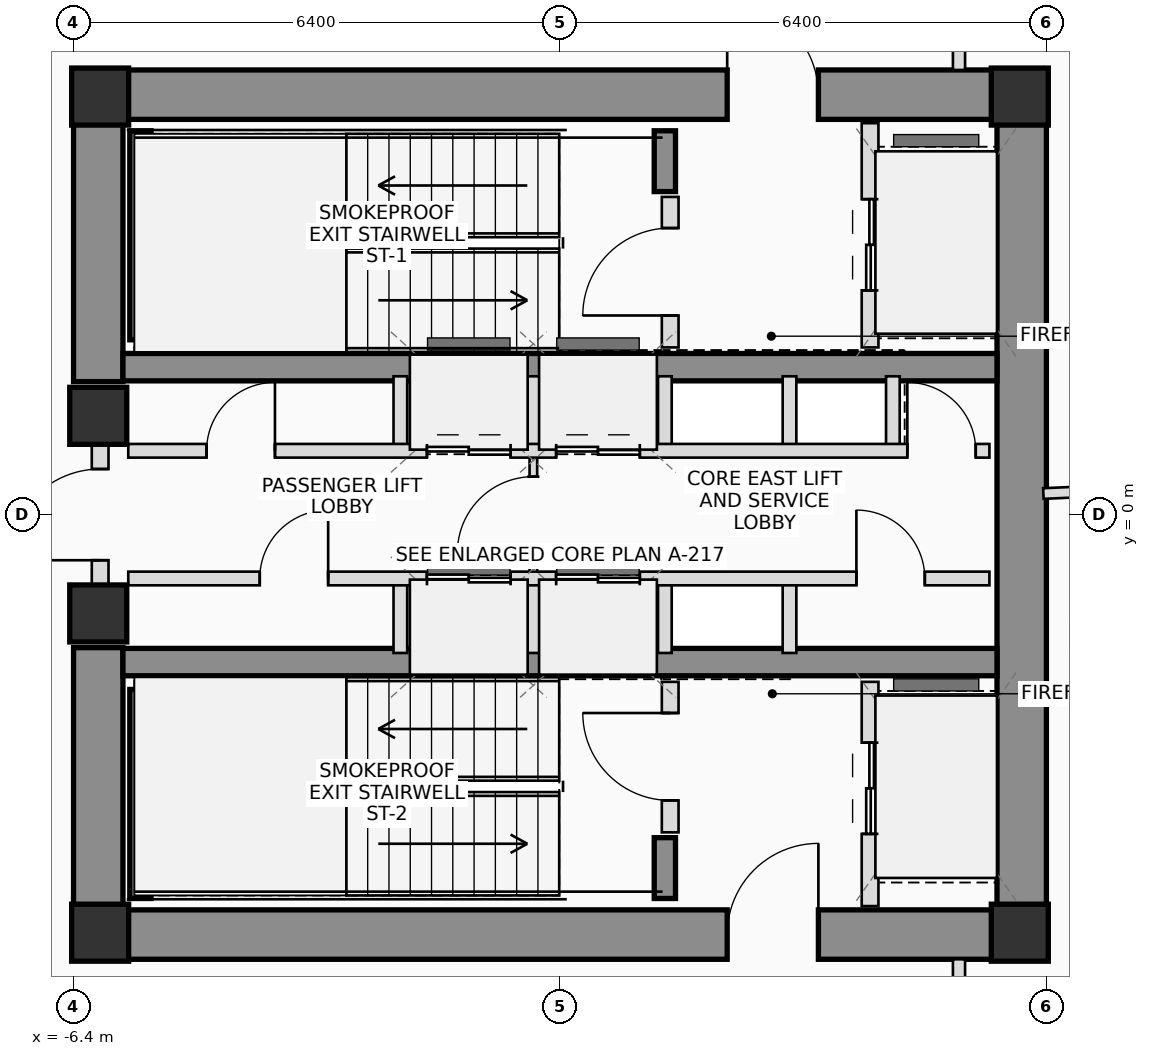
"""IFC4 building model, lengths in metres.
Left out: names, types, materials, properties, quantities, classifications, styles, units other than length and angle.
Written with IfcOpenShell. Run it as: python <this file> out.ifc"""

import sys

from ifc_helpers import new_model, si_unit, direction, frame, frame_2d, origin, origin_2d, place, context, subcontext, project, spatial, rectangle, extrude, source, transform, mapped, element, fill, save


model = new_model("IFC4")
c1 = context("Model", 3, precision=1e-05, world=origin(), true_north=direction((0.0, 1.0)))
c2 = subcontext(c1, "Body", "Model", "MODEL_VIEW")
j1 = project(units=[si_unit("LENGTHUNIT", "METRE"), si_unit("PLANEANGLEUNIT", "RADIAN")], contexts=[c1])
p1 = place(None, origin())
s1 = spatial("IfcSite", under=j1, at=p1, CompositionType="ELEMENT")
p2 = place(p1, origin())
s2 = spatial("IfcBuilding", under=s1, at=p2, CompositionType="ELEMENT")
p3 = place(p2, frame((0.0, 0.0, 182.9)))
s3 = spatial("IfcBuildingStorey", under=s2, at=p3, CompositionType="ELEMENT", Elevation=182.9)
m1 = source(origin(), c2, "Body", "SweptSolid", [
    extrude(rectangle(XDim=0.75, YDim=0.75, at=origin_2d()), origin(), (0.0, 0.0, 1.0), 3.45),
])
for number, where, z_axis, x_axis in (
    (1, (-6.05, -5.5, 0.0), (0.0, 0.0, 1.0), (1.0, 0.0, 0.0)),
    (2, (6.05, -5.5, 0.0), (0.0, 0.0, 1.0), (1.0, 0.0, 0.0)),
    (3, (6.05, 5.5, 0.0), (0.0, 0.0, 1.0), (1.0, 0.0, 0.0)),
    (4, (-6.05, 5.5, 0.0), (0.0, 0.0, 1.0), (1.0, 0.0, 0.0)),
):
    element("IfcColumn", number, at=place(p3, frame(where, z_axis=z_axis, x_axis=x_axis)), inside=s3, PredefinedType="COLUMN", context=c2, shape_type="MappedRepresentation", body=[
        mapped(m1, transform((0.0, 0.0, 0.0), scale=1.0)),
    ])
p4 = place(p3, frame((-6.4, 5.525, 0.0), z_axis=(0.0, 0.0, 1.0), x_axis=(1.0, 0.0, 0.0)))
e5 = element("IfcWall", 5, at=p4, inside=s3, PredefinedType="SHEAR", context=c2, shape_type="SweptSolid", body=[
    extrude(rectangle(XDim=12.8, YDim=0.65, at=frame_2d((6.4, 0.0))), origin(), (0.0, 0.0, 1.0), 3.45),
])
p5 = place(p4, frame((8.6, 0.0, 0.0)))
e6 = element("IfcOpeningElement", 6, at=p5, cuts=e5, PredefinedType="OPENING", context=c2, shape_type="SweptSolid", body=[
    extrude(rectangle(XDim=1.2, YDim=2.2, at=frame_2d((0.6, 1.1))), frame((0.0, 0.335, 0.0), z_axis=(0.0, -1.0, 0.0), x_axis=(1.0, 0.0, 0.0)), (0.0, 0.0, 1.0), 0.67),
])
p6 = place(p3, frame((-6.4, -5.525, 0.0), z_axis=(0.0, 0.0, 1.0), x_axis=(1.0, 0.0, 0.0)))
e7 = element("IfcWall", 7, at=p6, inside=s3, PredefinedType="SHEAR", context=c2, shape_type="SweptSolid", body=[
    extrude(rectangle(XDim=12.8, YDim=0.65, at=frame_2d((6.4, 0.0))), origin(), (0.0, 0.0, 1.0), 3.45),
])
p7 = place(p6, frame((8.6, 0.0, 0.0)))
e8 = element("IfcOpeningElement", 8, at=p7, cuts=e7, PredefinedType="OPENING", context=c2, shape_type="SweptSolid", body=[
    extrude(rectangle(XDim=1.2, YDim=2.2, at=frame_2d((0.6, 1.1))), frame((0.0, 0.335, 0.0), z_axis=(0.0, -1.0, 0.0), x_axis=(1.0, 0.0, 0.0)), (0.0, 0.0, 1.0), 0.67),
])
p8 = place(p3, frame((6.075, -5.2, 0.0), z_axis=(0.0, 0.0, 1.0), x_axis=(0.0, 1.0, 0.0)))
e9 = element("IfcWall", 9, at=p8, inside=s3, PredefinedType="SHEAR", context=c2, shape_type="SweptSolid", body=[
    extrude(rectangle(XDim=10.4, YDim=0.65, at=frame_2d((5.2, 0.0))), origin(), (0.0, 0.0, 1.0), 3.45),
])
for number, where, z_axis, x_axis in (
    (10, (-6.075, -5.2, 0.0), (0.0, 0.0, 1.0), (0.0, 1.0, 0.0)),
    (11, (-6.075, 1.75, 0.0), (0.0, 0.0, 1.0), (0.0, 1.0, 0.0)),
):
    element("IfcWall", number, at=place(p3, frame(where, z_axis=z_axis, x_axis=x_axis)), inside=s3, PredefinedType="SHEAR", context=c2, shape_type="SweptSolid", body=[
        extrude(rectangle(XDim=3.45, YDim=0.65, at=frame_2d((1.725, 0.0))), origin(), (0.0, 0.0, 1.0), 3.45),
    ])
for number, where, z_axis, x_axis in (
    (12, (-5.75, 1.94, 0.0), (0.0, 0.0, 1.0), (1.0, 0.0, 0.0)),
    (13, (-5.75, -1.94, 0.0), (0.0, 0.0, 1.0), (1.0, 0.0, 0.0)),
):
    element("IfcWall", number, at=place(p3, frame(where, z_axis=z_axis, x_axis=x_axis)), inside=s3, PredefinedType="SHEAR", context=c2, shape_type="SweptSolid", body=[
        extrude(rectangle(XDim=11.5, YDim=0.36, at=frame_2d((5.75, 0.0))), origin(), (0.0, 0.0, 1.0), 3.45),
    ])
p9 = place(p3, frame((-5.52, 2.3, 0.0), z_axis=(0.0, 0.0, 1.0), x_axis=(0.0, 1.0, 0.0)))
e14 = element("IfcWall", 14, at=p9, inside=s3, PredefinedType="SHEAR", context=c2, shape_type="SweptSolid", body=[
    extrude(rectangle(XDim=2.75, YDim=0.28, at=frame_2d((1.375, 0.0))), origin(), (0.0, 0.0, 1.0), 3.45),
])
p10 = place(p3, frame((1.38, 4.25, 0.0), z_axis=(0.0, 0.0, 1.0), x_axis=(0.0, 1.0, 0.0)))
e15 = element("IfcWall", 15, at=p10, inside=s3, PredefinedType="SHEAR", context=c2, shape_type="SweptSolid", body=[
    extrude(rectangle(XDim=0.8, YDim=0.28, at=frame_2d((0.4, 0.0))), origin(), (0.0, 0.0, 1.0), 3.45),
])
p11 = place(p3, frame((-5.52, -5.05, 0.0), z_axis=(0.0, 0.0, 1.0), x_axis=(0.0, 1.0, 0.0)))
e16 = element("IfcWall", 16, at=p11, inside=s3, PredefinedType="SHEAR", context=c2, shape_type="SweptSolid", body=[
    extrude(rectangle(XDim=2.75, YDim=0.28, at=frame_2d((1.375, 0.0))), origin(), (0.0, 0.0, 1.0), 3.45),
])
p12 = place(p3, frame((1.38, -5.05, 0.0), z_axis=(0.0, 0.0, 1.0), x_axis=(0.0, 1.0, 0.0)))
e17 = element("IfcWall", 17, at=p12, inside=s3, PredefinedType="SHEAR", context=c2, shape_type="SweptSolid", body=[
    extrude(rectangle(XDim=0.8, YDim=0.28, at=frame_2d((0.4, 0.0))), origin(), (0.0, 0.0, 1.0), 3.45),
])
for number, where, z_axis, x_axis in (
    (18, (-6.075, -1.3, 0.0), (0.0, 0.0, 1.0), (1.0, 0.0, 0.0)),
    (19, (-6.075, 1.3, 0.0), (0.0, 0.0, 1.0), (1.0, 0.0, 0.0)),
):
    element("IfcColumn", number, at=place(p3, frame(where, z_axis=z_axis, x_axis=x_axis)), inside=s3, PredefinedType="COLUMN", context=c2, shape_type="MappedRepresentation", body=[
        mapped(m1, transform((0.0, 0.0, 0.0), scale=1.0)),
    ])
p13 = place(p3, frame((-6.05, -0.95, 0.0), z_axis=(0.0, 0.0, 1.0), x_axis=(0.0, 1.0, 0.0)))
e20 = element("IfcWall", 20, at=p13, inside=s3, PredefinedType="PLUMBINGWALL", context=c2, shape_type="SweptSolid", body=[
    extrude(rectangle(XDim=1.9, YDim=0.22, at=frame_2d((0.95, 0.0))), origin(), (0.0, 0.0, 1.0), 2.19),
])
p14 = place(p13, frame((0.35, 0.0, 0.0)))
e21 = element("IfcOpeningElement", 21, at=p14, cuts=e20, PredefinedType="OPENING", context=c2, shape_type="SweptSolid", body=[
    extrude(rectangle(XDim=1.2, YDim=2.2, at=frame_2d((0.6, 1.1))), frame((0.0, 0.12, 0.0), z_axis=(0.0, -1.0, 0.0), x_axis=(1.0, 0.0, 0.0)), (0.0, 0.0, 1.0), 0.24),
])
p15 = place(p3, frame((1.45, 2.2, 0.0), z_axis=(0.0, 0.0, 1.0), x_axis=(0.0, 1.0, 0.0)))
e22 = element("IfcWall", 22, at=p15, inside=s3, PredefinedType="PLUMBINGWALL", context=c2, shape_type="SweptSolid", body=[
    extrude(rectangle(XDim=1.98, YDim=0.22, at=frame_2d((0.99, 0.0))), origin(), (0.0, 0.0, 1.0), 3.21),
])
p16 = place(p15, frame((0.42, 0.0, 0.0)))
e23 = element("IfcOpeningElement", 23, at=p16, cuts=e22, PredefinedType="OPENING", context=c2, shape_type="SweptSolid", body=[
    extrude(rectangle(XDim=1.15, YDim=2.15, at=frame_2d((0.575, 1.075))), frame((0.0, 0.12, 0.0), z_axis=(0.0, -1.0, 0.0), x_axis=(1.0, 0.0, 0.0)), (0.0, 0.0, 1.0), 0.24),
])
p17 = place(p3, frame((4.08, 2.2, 0.0), z_axis=(0.0, 0.0, 1.0), x_axis=(0.0, 1.0, 0.0)))
e24 = element("IfcWall", 24, at=p17, inside=s3, PredefinedType="PLUMBINGWALL", context=c2, shape_type="SweptSolid", body=[
    extrude(rectangle(XDim=2.95, YDim=0.22, at=frame_2d((1.475, 0.0))), origin(), (0.0, 0.0, 1.0), 3.21),
])
p18 = place(p17, frame((0.75, 0.0, 0.0)))
e25 = element("IfcOpeningElement", 25, at=p18, cuts=e24, PredefinedType="OPENING", context=c2, shape_type="SweptSolid", body=[
    extrude(rectangle(XDim=1.2, YDim=2.25, at=frame_2d((0.6, 1.125))), frame((0.0, 0.12, 0.0), z_axis=(0.0, -1.0, 0.0), x_axis=(1.0, 0.0, 0.0)), (0.0, 0.0, 1.0), 0.24),
])
p19 = place(p3, frame((1.45, -4.18, 0.0), z_axis=(0.0, 0.0, 1.0), x_axis=(0.0, 1.0, 0.0)))
e26 = element("IfcWall", 26, at=p19, inside=s3, PredefinedType="PLUMBINGWALL", context=c2, shape_type="SweptSolid", body=[
    extrude(rectangle(XDim=1.98, YDim=0.22, at=frame_2d((0.99, 0.0))), origin(), (0.0, 0.0, 1.0), 3.21),
])
p20 = place(p19, frame((0.42, 0.0, 0.0)))
e27 = element("IfcOpeningElement", 27, at=p20, cuts=e26, PredefinedType="OPENING", context=c2, shape_type="SweptSolid", body=[
    extrude(rectangle(XDim=1.15, YDim=2.15, at=frame_2d((0.575, 1.075))), frame((0.0, 0.12, 0.0), z_axis=(0.0, -1.0, 0.0), x_axis=(1.0, 0.0, 0.0)), (0.0, 0.0, 1.0), 0.24),
])
p21 = place(p3, frame((4.08, -5.15, 0.0), z_axis=(0.0, 0.0, 1.0), x_axis=(0.0, 1.0, 0.0)))
e28 = element("IfcWall", 28, at=p21, inside=s3, PredefinedType="PLUMBINGWALL", context=c2, shape_type="SweptSolid", body=[
    extrude(rectangle(XDim=2.95, YDim=0.22, at=frame_2d((1.475, 0.0))), origin(), (0.0, 0.0, 1.0), 3.21),
])
p22 = place(p21, frame((0.95, 0.0, 0.0)))
e29 = element("IfcOpeningElement", 29, at=p22, cuts=e28, PredefinedType="OPENING", context=c2, shape_type="SweptSolid", body=[
    extrude(rectangle(XDim=1.2, YDim=2.25, at=frame_2d((0.6, 1.125))), frame((0.0, 0.12, 0.0), z_axis=(0.0, -1.0, 0.0), x_axis=(1.0, 0.0, 0.0)), (0.0, 0.0, 1.0), 0.24),
])
p23 = place(p3, frame((-0.35, -0.84, 0.0), z_axis=(0.0, 0.0, 1.0), x_axis=(0.0, 1.0, 0.0)))
e30 = element("IfcWall", 30, at=p23, inside=s3, PredefinedType="PARTITIONING", context=c2, shape_type="SweptSolid", body=[
    extrude(rectangle(XDim=1.68, YDim=0.1, at=frame_2d((0.84, 0.0))), origin(), (0.0, 0.0, 1.0), 3.21),
])
p24 = place(p23, frame((0.34, 0.0, 0.0)))
e31 = element("IfcOpeningElement", 31, at=p24, cuts=e30, PredefinedType="OPENING", context=c2, shape_type="SweptSolid", body=[
    extrude(rectangle(XDim=1.0, YDim=2.25, at=frame_2d((0.5, 1.125))), frame((0.0, 0.06, 0.0), z_axis=(0.0, -1.0, 0.0), x_axis=(1.0, 0.0, 0.0)), (0.0, 0.0, 1.0), 0.12),
])
for number, where, z_axis, x_axis in (
    (32, (-2.1, 0.84, 0.0), (0.0, 0.0, 1.0), (0.0, 1.0, 0.0)),
    (33, (-2.1, -1.82, 0.0), (0.0, 0.0, 1.0), (0.0, 1.0, 0.0)),
    (34, (-0.35, 0.84, 0.0), (0.0, 0.0, 1.0), (0.0, 1.0, 0.0)),
    (35, (-0.35, -1.82, 0.0), (0.0, 0.0, 1.0), (0.0, 1.0, 0.0)),
    (36, (1.38, 0.84, 0.0), (0.0, 0.0, 1.0), (0.0, 1.0, 0.0)),
    (37, (1.38, -1.82, 0.0), (0.0, 0.0, 1.0), (0.0, 1.0, 0.0)),
    (38, (3.02, 0.84, 0.0), (0.0, 0.0, 1.0), (0.0, 1.0, 0.0)),
    (39, (4.38, 0.84, 0.0), (0.0, 0.0, 1.0), (0.0, 1.0, 0.0)),
    (40, (3.02, -1.82, 0.0), (0.0, 0.0, 1.0), (0.0, 1.0, 0.0)),
):
    element("IfcWall", number, at=place(p3, frame(where, z_axis=z_axis, x_axis=x_axis)), inside=s3, PredefinedType="PLUMBINGWALL", context=c2, shape_type="SweptSolid", body=[
        extrude(rectangle(XDim=0.98, YDim=0.18, at=frame_2d((0.49, 0.0))), origin(), (0.0, 0.0, 1.0), 3.21),
    ])
p25 = place(p3, frame((-5.68, 0.84, 0.0), z_axis=(0.0, 0.0, 1.0), x_axis=(1.0, 0.0, 0.0)))
e41 = element("IfcWall", 41, at=p25, inside=s3, PredefinedType="PLUMBINGWALL", context=c2, shape_type="SweptSolid", body=[
    extrude(rectangle(XDim=11.33, YDim=0.18, at=frame_2d((5.665, 0.0))), origin(), (0.0, 0.0, 1.0), 3.21),
])
p26 = place(p25, frame((1.03, 0.0, 0.0)))
e42 = element("IfcOpeningElement", 42, at=p26, cuts=e41, PredefinedType="OPENING", context=c2, shape_type="SweptSolid", body=[
    extrude(rectangle(XDim=0.9, YDim=2.05, at=frame_2d((0.45, 1.025))), frame((0.0, 0.1, 0.0), z_axis=(0.0, -1.0, 0.0), x_axis=(1.0, 0.0, 0.0)), (0.0, 0.0, 1.0), 0.2),
])
p27 = place(p25, frame((3.93, 0.0, 0.0)))
e43 = element("IfcOpeningElement", 43, at=p27, cuts=e41, PredefinedType="OPENING", context=c2, shape_type="SweptSolid", body=[
    extrude(rectangle(XDim=1.1, YDim=2.2, at=frame_2d((0.55, 1.1))), frame((0.0, 0.1, 0.0), z_axis=(0.0, -1.0, 0.0), x_axis=(1.0, 0.0, 0.0)), (0.0, 0.0, 1.0), 0.2),
])
p28 = place(p25, frame((5.63, 0.0, 0.0)))
e44 = element("IfcOpeningElement", 44, at=p28, cuts=e41, PredefinedType="OPENING", context=c2, shape_type="SweptSolid", body=[
    extrude(rectangle(XDim=1.1, YDim=2.2, at=frame_2d((0.55, 1.1))), frame((0.0, 0.1, 0.0), z_axis=(0.0, -1.0, 0.0), x_axis=(1.0, 0.0, 0.0)), (0.0, 0.0, 1.0), 0.2),
])
p29 = place(p25, frame((10.25, 0.0, 0.0)))
e45 = element("IfcOpeningElement", 45, at=p29, cuts=e41, PredefinedType="OPENING", context=c2, shape_type="SweptSolid", body=[
    extrude(rectangle(XDim=0.9, YDim=2.05, at=frame_2d((0.45, 1.025))), frame((0.0, 0.1, 0.0), z_axis=(0.0, -1.0, 0.0), x_axis=(1.0, 0.0, 0.0)), (0.0, 0.0, 1.0), 0.2),
])
p30 = place(p3, frame((-5.68, -0.84, 0.0), z_axis=(0.0, 0.0, 1.0), x_axis=(1.0, 0.0, 0.0)))
e46 = element("IfcWall", 46, at=p30, inside=s3, PredefinedType="PLUMBINGWALL", context=c2, shape_type="SweptSolid", body=[
    extrude(rectangle(XDim=11.33, YDim=0.18, at=frame_2d((5.665, 0.0))), origin(), (0.0, 0.0, 1.0), 3.21),
])
p31 = place(p30, frame((1.73, 0.0, 0.0)))
e47 = element("IfcOpeningElement", 47, at=p31, cuts=e46, PredefinedType="OPENING", context=c2, shape_type="SweptSolid", body=[
    extrude(rectangle(XDim=0.9, YDim=2.05, at=frame_2d((0.45, 1.025))), frame((0.0, 0.1, 0.0), z_axis=(0.0, -1.0, 0.0), x_axis=(1.0, 0.0, 0.0)), (0.0, 0.0, 1.0), 0.2),
])
p32 = place(p30, frame((3.93, 0.0, 0.0)))
e48 = element("IfcOpeningElement", 48, at=p32, cuts=e46, PredefinedType="OPENING", context=c2, shape_type="SweptSolid", body=[
    extrude(rectangle(XDim=1.1, YDim=2.2, at=frame_2d((0.55, 1.1))), frame((0.0, 0.1, 0.0), z_axis=(0.0, -1.0, 0.0), x_axis=(1.0, 0.0, 0.0)), (0.0, 0.0, 1.0), 0.2),
])
p33 = place(p30, frame((5.63, 0.0, 0.0)))
e49 = element("IfcOpeningElement", 49, at=p33, cuts=e46, PredefinedType="OPENING", context=c2, shape_type="SweptSolid", body=[
    extrude(rectangle(XDim=1.1, YDim=2.2, at=frame_2d((0.55, 1.1))), frame((0.0, 0.1, 0.0), z_axis=(0.0, -1.0, 0.0), x_axis=(1.0, 0.0, 0.0)), (0.0, 0.0, 1.0), 0.2),
])
p34 = place(p30, frame((9.58, 0.0, 0.0)))
e50 = element("IfcOpeningElement", 50, at=p34, cuts=e46, PredefinedType="OPENING", context=c2, shape_type="SweptSolid", body=[
    extrude(rectangle(XDim=0.9, YDim=2.05, at=frame_2d((0.45, 1.025))), frame((0.0, 0.1, 0.0), z_axis=(0.0, -1.0, 0.0), x_axis=(1.0, 0.0, 0.0)), (0.0, 0.0, 1.0), 0.2),
])
for number, where, z_axis, x_axis in (
    (51, (5.25, 7.6, 0.0), (0.0, 0.0, 1.0), (0.0, -1.0, 0.0)),
    (52, (5.25, -5.85, 0.0), (0.0, 0.0, 1.0), (0.0, -1.0, 0.0)),
):
    element("IfcWall", number, at=place(p3, frame(where, z_axis=z_axis, x_axis=x_axis)), inside=s3, PredefinedType="PARTITIONING", context=c2, shape_type="SweptSolid", body=[
        extrude(rectangle(XDim=1.75, YDim=0.16, at=frame_2d((0.875, 0.0))), origin(), (0.0, 0.0, 1.0), 3.21),
    ])
p35 = place(p3, frame((6.36, 0.278, 0.0), z_axis=(0.0, 0.0, 1.0), x_axis=(0.999047543566, 0.043634913719, 0.0)))
e53 = element("IfcWall", 53, at=p35, inside=s3, PredefinedType="PARTITIONING", context=c2, shape_type="SweptSolid", body=[
    extrude(rectangle(XDim=7.503, YDim=0.14, at=frame_2d((3.751, 0.0))), origin(), (0.0, 0.0, 1.0), 2.725),
])
p36 = place(p5, origin())
e54 = element("IfcDoor", 54, at=p36, inside=s3, OperationType="SINGLE_SWING_LEFT", PredefinedType="DOOR", context=c2, shape_type="SweptSolid", body=[
    extrude(rectangle(XDim=1.2, YDim=2.2, at=frame_2d((0.6, 1.1))), frame((0.0, 0.025, 0.0), z_axis=(0.0, -1.0, 0.0), x_axis=(1.0, 0.0, 0.0)), (0.0, 0.0, 1.0), 0.05),
])
fill(e6, e54)
p37 = place(p7, origin())
e55 = element("IfcDoor", 55, at=p37, inside=s3, OperationType="SINGLE_SWING_RIGHT", PredefinedType="DOOR", context=c2, shape_type="SweptSolid", body=[
    extrude(rectangle(XDim=1.2, YDim=2.2, at=frame_2d((0.6, 1.1))), frame((0.0, 0.025, 0.0), z_axis=(0.0, -1.0, 0.0), x_axis=(1.0, 0.0, 0.0)), (0.0, 0.0, 1.0), 0.05),
])
fill(e8, e55)
p38 = place(p14, origin())
e56 = element("IfcDoor", 56, at=p38, inside=s3, OperationType="SINGLE_SWING_LEFT", PredefinedType="DOOR", context=c2, shape_type="SweptSolid", body=[
    extrude(rectangle(XDim=1.2, YDim=2.2, at=frame_2d((0.6, 1.1))), frame((0.0, 0.025, 0.0), z_axis=(0.0, -1.0, 0.0), x_axis=(1.0, 0.0, 0.0)), (0.0, 0.0, 1.0), 0.05),
])
fill(e21, e56)
p39 = place(p16, origin())
e57 = element("IfcDoor", 57, at=p39, inside=s3, OperationType="SINGLE_SWING_LEFT", PredefinedType="DOOR", context=c2, shape_type="SweptSolid", body=[
    extrude(rectangle(XDim=1.15, YDim=2.15, at=frame_2d((0.575, 1.075))), frame((0.0, 0.025, 0.0), z_axis=(0.0, -1.0, 0.0), x_axis=(1.0, 0.0, 0.0)), (0.0, 0.0, 1.0), 0.05),
])
fill(e23, e57)
p40 = place(p18, origin())
e58 = element("IfcDoor", 58, at=p40, inside=s3, OperationType="DOUBLE_DOOR_SLIDING", PredefinedType="DOOR", context=c2, shape_type="SweptSolid", body=[
    extrude(rectangle(XDim=1.2, YDim=2.25, at=frame_2d((0.6, 1.125))), frame((0.0, 0.025, 0.0), z_axis=(0.0, -1.0, 0.0), x_axis=(1.0, 0.0, 0.0)), (0.0, 0.0, 1.0), 0.05),
])
fill(e25, e58)
p41 = place(p20, origin())
e59 = element("IfcDoor", 59, at=p41, inside=s3, OperationType="SINGLE_SWING_RIGHT", PredefinedType="DOOR", context=c2, shape_type="SweptSolid", body=[
    extrude(rectangle(XDim=1.15, YDim=2.15, at=frame_2d((0.575, 1.075))), frame((0.0, 0.025, 0.0), z_axis=(0.0, -1.0, 0.0), x_axis=(1.0, 0.0, 0.0)), (0.0, 0.0, 1.0), 0.05),
])
fill(e27, e59)
p42 = place(p22, origin())
e60 = element("IfcDoor", 60, at=p42, inside=s3, OperationType="DOUBLE_DOOR_SLIDING", PredefinedType="DOOR", context=c2, shape_type="SweptSolid", body=[
    extrude(rectangle(XDim=1.2, YDim=2.25, at=frame_2d((0.6, 1.125))), frame((0.0, 0.025, 0.0), z_axis=(0.0, -1.0, 0.0), x_axis=(1.0, 0.0, 0.0)), (0.0, 0.0, 1.0), 0.05),
])
fill(e29, e60)
p43 = place(p24, origin())
e61 = element("IfcDoor", 61, at=p43, inside=s3, OperationType="SINGLE_SWING_LEFT", PredefinedType="DOOR", context=c2, shape_type="SweptSolid", body=[
    extrude(rectangle(XDim=1.0, YDim=2.25, at=frame_2d((0.5, 1.125))), frame((0.0, 0.025, 0.0), z_axis=(0.0, -1.0, 0.0), x_axis=(1.0, 0.0, 0.0)), (0.0, 0.0, 1.0), 0.05),
])
fill(e31, e61)
p44 = place(p26, origin())
e62 = element("IfcDoor", 62, at=p44, inside=s3, OperationType="SINGLE_SWING_RIGHT", PredefinedType="DOOR", context=c2, shape_type="SweptSolid", body=[
    extrude(rectangle(XDim=0.9, YDim=2.05, at=frame_2d((0.45, 1.025))), frame((0.0, 0.025, 0.0), z_axis=(0.0, -1.0, 0.0), x_axis=(1.0, 0.0, 0.0)), (0.0, 0.0, 1.0), 0.05),
])
fill(e42, e62)
p45 = place(p27, origin())
e63 = element("IfcDoor", 63, at=p45, inside=s3, OperationType="DOUBLE_DOOR_SLIDING", PredefinedType="DOOR", context=c2, shape_type="SweptSolid", body=[
    extrude(rectangle(XDim=1.1, YDim=2.2, at=frame_2d((0.55, 1.1))), frame((0.0, 0.025, 0.0), z_axis=(0.0, -1.0, 0.0), x_axis=(1.0, 0.0, 0.0)), (0.0, 0.0, 1.0), 0.05),
])
fill(e43, e63)
p46 = place(p28, origin())
e64 = element("IfcDoor", 64, at=p46, inside=s3, OperationType="DOUBLE_DOOR_SLIDING", PredefinedType="DOOR", context=c2, shape_type="SweptSolid", body=[
    extrude(rectangle(XDim=1.1, YDim=2.2, at=frame_2d((0.55, 1.1))), frame((0.0, 0.025, 0.0), z_axis=(0.0, -1.0, 0.0), x_axis=(1.0, 0.0, 0.0)), (0.0, 0.0, 1.0), 0.05),
])
fill(e44, e64)
p47 = place(p29, origin())
e65 = element("IfcDoor", 65, at=p47, inside=s3, OperationType="SINGLE_SWING_LEFT", PredefinedType="DOOR", context=c2, shape_type="SweptSolid", body=[
    extrude(rectangle(XDim=0.9, YDim=2.05, at=frame_2d((0.45, 1.025))), frame((0.0, 0.025, 0.0), z_axis=(0.0, -1.0, 0.0), x_axis=(1.0, 0.0, 0.0)), (0.0, 0.0, 1.0), 0.05),
])
fill(e45, e65)
p48 = place(p31, origin())
e66 = element("IfcDoor", 66, at=p48, inside=s3, OperationType="SINGLE_SWING_RIGHT", PredefinedType="DOOR", context=c2, shape_type="SweptSolid", body=[
    extrude(rectangle(XDim=0.9, YDim=2.05, at=frame_2d((0.45, 1.025))), frame((0.0, 0.025, 0.0), z_axis=(0.0, -1.0, 0.0), x_axis=(1.0, 0.0, 0.0)), (0.0, 0.0, 1.0), 0.05),
])
fill(e47, e66)
p49 = place(p32, origin())
e67 = element("IfcDoor", 67, at=p49, inside=s3, OperationType="DOUBLE_DOOR_SLIDING", PredefinedType="DOOR", context=c2, shape_type="SweptSolid", body=[
    extrude(rectangle(XDim=1.1, YDim=2.2, at=frame_2d((0.55, 1.1))), frame((0.0, 0.025, 0.0), z_axis=(0.0, -1.0, 0.0), x_axis=(1.0, 0.0, 0.0)), (0.0, 0.0, 1.0), 0.05),
])
fill(e48, e67)
p50 = place(p33, origin())
e68 = element("IfcDoor", 68, at=p50, inside=s3, OperationType="DOUBLE_DOOR_SLIDING", PredefinedType="DOOR", context=c2, shape_type="SweptSolid", body=[
    extrude(rectangle(XDim=1.1, YDim=2.2, at=frame_2d((0.55, 1.1))), frame((0.0, 0.025, 0.0), z_axis=(0.0, -1.0, 0.0), x_axis=(1.0, 0.0, 0.0)), (0.0, 0.0, 1.0), 0.05),
])
fill(e49, e68)
p51 = place(p34, origin())
e69 = element("IfcDoor", 69, at=p51, inside=s3, OperationType="SINGLE_SWING_LEFT", PredefinedType="DOOR", context=c2, shape_type="SweptSolid", body=[
    extrude(rectangle(XDim=0.9, YDim=2.05, at=frame_2d((0.45, 1.025))), frame((0.0, 0.025, 0.0), z_axis=(0.0, -1.0, 0.0), x_axis=(1.0, 0.0, 0.0)), (0.0, 0.0, 1.0), 0.05),
])
fill(e50, e69)
save(model, sys.argv[1])
